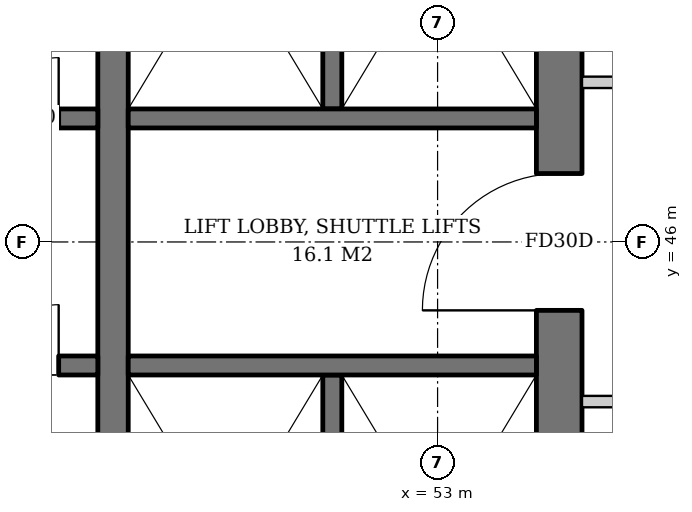
"""IFC4 building model, lengths in metres.
Left out: names, types, materials, properties, quantities, classifications, styles, units other than length and angle.
Written with IfcOpenShell. Run it as: python <this file> out.ifc"""

import sys

from ifc_helpers import new_model, si_unit, direction, frame, frame_2d, origin, place, context, subcontext, project, spatial, rectangle, extrude, element, fill, save


model = new_model("IFC4")
c1 = context("Model", 3, precision=1e-05, world=origin(), true_north=direction((0.0, 1.0)))
c2 = subcontext(c1, "Body", "Model", "MODEL_VIEW")
j1 = project(units=[si_unit("LENGTHUNIT", "METRE"), si_unit("PLANEANGLEUNIT", "RADIAN")], contexts=[c1])
p1 = place(None, origin())
s1 = spatial("IfcSite", under=j1, at=p1, CompositionType="ELEMENT")
p2 = place(p1, origin())
s2 = spatial("IfcBuilding", under=s1, at=p2, CompositionType="ELEMENT")
p3 = place(p2, frame((0.0, 0.0, 203.4)))
s3 = spatial("IfcBuildingStorey", under=s2, at=p3, CompositionType="ELEMENT", Elevation=203.4)
p4 = place(p3, frame((54.6, 36.7, 0.0), z_axis=(0.0, 0.0, 1.0), x_axis=(0.0, 1.0, 0.0)))
e1 = element("IfcWall", 1, at=p4, inside=s3, PredefinedType="SHEAR", context=c2, shape_type="SweptSolid", body=[
    extrude(rectangle(XDim=18.6, YDim=0.6, at=frame_2d((9.3, 0.0))), origin(), (0.0, 0.0, 1.0), 3.8),
])
p5 = place(p4, frame((8.4, 0.0, 0.0)))
e2 = element("IfcOpeningElement", 2, at=p5, cuts=e1, PredefinedType="OPENING", context=c2, shape_type="SweptSolid", body=[
    extrude(rectangle(XDim=1.8, YDim=2.4, at=frame_2d((0.9, 1.2))), frame((0.0, 0.31, 0.0), z_axis=(0.0, -1.0, 0.0), x_axis=(1.0, 0.0, 0.0)), (0.0, 0.0, 1.0), 0.62),
])
p6 = place(p3, frame((48.73, 40.0, 0.0), z_axis=(0.0, 0.0, 1.0), x_axis=(0.0, 1.0, 0.0)))
e3 = element("IfcWall", 3, at=p6, inside=s3, PredefinedType="SHEAR", context=c2, shape_type="SweptSolid", body=[
    extrude(rectangle(XDim=12.0, YDim=0.4, at=frame_2d((6.0, 0.0))), origin(), (0.0, 0.0, 1.0), 3.8),
])
p7 = place(p3, frame((35.7, 47.625, 0.0), z_axis=(0.0, 0.0, 1.0), x_axis=(1.0, 0.0, 0.0)))
e4 = element("IfcWall", 4, at=p7, inside=s3, PredefinedType="SHEAR", context=c2, shape_type="SweptSolid", body=[
    extrude(rectangle(XDim=12.83, YDim=0.25, at=frame_2d((6.415, 0.0))), origin(), (0.0, 0.0, 1.0), 3.8),
])
p8 = place(p7, frame((0.7, 0.0, 0.0)))
e5 = element("IfcOpeningElement", 5, at=p8, cuts=e4, PredefinedType="OPENING", context=c2, shape_type="SweptSolid", body=[
    extrude(rectangle(XDim=1.1, YDim=2.2, at=frame_2d((0.55, 1.1))), frame((0.0, 0.135, 0.0), z_axis=(0.0, -1.0, 0.0), x_axis=(1.0, 0.0, 0.0)), (0.0, 0.0, 1.0), 0.27),
])
p9 = place(p7, frame((3.45, 0.0, 0.0)))
e6 = element("IfcOpeningElement", 6, at=p9, cuts=e4, PredefinedType="OPENING", context=c2, shape_type="SweptSolid", body=[
    extrude(rectangle(XDim=1.1, YDim=2.2, at=frame_2d((0.55, 1.1))), frame((0.0, 0.135, 0.0), z_axis=(0.0, -1.0, 0.0), x_axis=(1.0, 0.0, 0.0)), (0.0, 0.0, 1.0), 0.27),
])
p10 = place(p7, frame((6.2, 0.0, 0.0)))
e7 = element("IfcOpeningElement", 7, at=p10, cuts=e4, PredefinedType="OPENING", context=c2, shape_type="SweptSolid", body=[
    extrude(rectangle(XDim=1.1, YDim=2.2, at=frame_2d((0.55, 1.1))), frame((0.0, 0.135, 0.0), z_axis=(0.0, -1.0, 0.0), x_axis=(1.0, 0.0, 0.0)), (0.0, 0.0, 1.0), 0.27),
])
p11 = place(p7, frame((9.0, 0.0, 0.0)))
e8 = element("IfcOpeningElement", 8, at=p11, cuts=e4, PredefinedType="OPENING", context=c2, shape_type="SweptSolid", body=[
    extrude(rectangle(XDim=1.0, YDim=2.1, at=frame_2d((0.5, 1.05))), frame((0.0, 0.135, 0.0), z_axis=(0.0, -1.0, 0.0), x_axis=(1.0, 0.0, 0.0)), (0.0, 0.0, 1.0), 0.27),
])
p12 = place(p7, frame((11.515, 0.0, 0.0)))
e9 = element("IfcOpeningElement", 9, at=p12, cuts=e4, PredefinedType="OPENING", context=c2, shape_type="SweptSolid", body=[
    extrude(rectangle(XDim=0.8, YDim=2.0, at=frame_2d((0.4, 1.0))), frame((0.0, 0.135, 0.0), z_axis=(0.0, -1.0, 0.0), x_axis=(1.0, 0.0, 0.0)), (0.0, 0.0, 1.0), 0.27),
])
p13 = place(p3, frame((35.7, 44.375, 0.0), z_axis=(0.0, 0.0, 1.0), x_axis=(1.0, 0.0, 0.0)))
e10 = element("IfcWall", 10, at=p13, inside=s3, PredefinedType="SHEAR", context=c2, shape_type="SweptSolid", body=[
    extrude(rectangle(XDim=12.83, YDim=0.25, at=frame_2d((6.415, 0.0))), origin(), (0.0, 0.0, 1.0), 3.8),
])
p14 = place(p13, frame((0.7, 0.0, 0.0)))
e11 = element("IfcOpeningElement", 11, at=p14, cuts=e10, PredefinedType="OPENING", context=c2, shape_type="SweptSolid", body=[
    extrude(rectangle(XDim=1.1, YDim=2.2, at=frame_2d((0.55, 1.1))), frame((0.0, 0.135, 0.0), z_axis=(0.0, -1.0, 0.0), x_axis=(1.0, 0.0, 0.0)), (0.0, 0.0, 1.0), 0.27),
])
p15 = place(p13, frame((3.45, 0.0, 0.0)))
e12 = element("IfcOpeningElement", 12, at=p15, cuts=e10, PredefinedType="OPENING", context=c2, shape_type="SweptSolid", body=[
    extrude(rectangle(XDim=1.1, YDim=2.2, at=frame_2d((0.55, 1.1))), frame((0.0, 0.135, 0.0), z_axis=(0.0, -1.0, 0.0), x_axis=(1.0, 0.0, 0.0)), (0.0, 0.0, 1.0), 0.27),
])
p16 = place(p13, frame((6.2, 0.0, 0.0)))
e13 = element("IfcOpeningElement", 13, at=p16, cuts=e10, PredefinedType="OPENING", context=c2, shape_type="SweptSolid", body=[
    extrude(rectangle(XDim=1.1, YDim=2.2, at=frame_2d((0.55, 1.1))), frame((0.0, 0.135, 0.0), z_axis=(0.0, -1.0, 0.0), x_axis=(1.0, 0.0, 0.0)), (0.0, 0.0, 1.0), 0.27),
])
p17 = place(p13, frame((9.0, 0.0, 0.0)))
e14 = element("IfcOpeningElement", 14, at=p17, cuts=e10, PredefinedType="OPENING", context=c2, shape_type="SweptSolid", body=[
    extrude(rectangle(XDim=1.0, YDim=2.1, at=frame_2d((0.5, 1.05))), frame((0.0, 0.135, 0.0), z_axis=(0.0, -1.0, 0.0), x_axis=(1.0, 0.0, 0.0)), (0.0, 0.0, 1.0), 0.27),
])
p18 = place(p13, frame((11.515, 0.0, 0.0)))
e15 = element("IfcOpeningElement", 15, at=p18, cuts=e10, PredefinedType="OPENING", context=c2, shape_type="SweptSolid", body=[
    extrude(rectangle(XDim=0.8, YDim=2.0, at=frame_2d((0.4, 1.0))), frame((0.0, 0.135, 0.0), z_axis=(0.0, -1.0, 0.0), x_axis=(1.0, 0.0, 0.0)), (0.0, 0.0, 1.0), 0.27),
])
p19 = place(p3, frame((51.615, 47.75, 0.0), z_axis=(0.0, 0.0, 1.0), x_axis=(0.0, 1.0, 0.0)))
e16 = element("IfcWall", 16, at=p19, inside=s3, PredefinedType="SHEAR", context=c2, shape_type="SweptSolid", body=[
    extrude(rectangle(XDim=4.25, YDim=0.25, at=frame_2d((2.125, 0.0))), origin(), (0.0, 0.0, 1.0), 3.8),
])
p20 = place(p3, frame((48.93, 47.625, 0.0), z_axis=(0.0, 0.0, 1.0), x_axis=(1.0, 0.0, 0.0)))
e17 = element("IfcWall", 17, at=p20, inside=s3, PredefinedType="SHEAR", context=c2, shape_type="SweptSolid", body=[
    extrude(rectangle(XDim=5.37, YDim=0.25, at=frame_2d((2.685, 0.0))), origin(), (0.0, 0.0, 1.0), 3.8),
])
p21 = place(p3, frame((51.615, 44.25, 0.0), z_axis=(0.0, 0.0, 1.0), x_axis=(0.0, -1.0, 0.0)))
e18 = element("IfcWall", 18, at=p21, inside=s3, PredefinedType="SHEAR", context=c2, shape_type="SweptSolid", body=[
    extrude(rectangle(XDim=4.25, YDim=0.25, at=frame_2d((2.125, 0.0))), origin(), (0.0, 0.0, 1.0), 3.8),
])
p22 = place(p3, frame((48.93, 44.375, 0.0), z_axis=(0.0, 0.0, 1.0), x_axis=(1.0, 0.0, 0.0)))
e19 = element("IfcWall", 19, at=p22, inside=s3, PredefinedType="SHEAR", context=c2, shape_type="SweptSolid", body=[
    extrude(rectangle(XDim=5.37, YDim=0.25, at=frame_2d((2.685, 0.0))), origin(), (0.0, 0.0, 1.0), 3.8),
])
p23 = place(p3, frame((54.9, 43.9, 0.0), z_axis=(0.0, 0.0, 1.0), x_axis=(1.0, 0.0, 0.0)))
e20 = element("IfcWall", 20, at=p23, inside=s3, PredefinedType="PARTITIONING", context=c2, shape_type="SweptSolid", body=[
    extrude(rectangle(XDim=2.925, YDim=0.15, at=frame_2d((1.462, 0.0))), origin(), (0.0, 0.0, 1.0), 3.62),
])
p24 = place(p3, frame((54.9, 48.1, 0.0), z_axis=(0.0, 0.0, 1.0), x_axis=(1.0, 0.0, 0.0)))
e21 = element("IfcWall", 21, at=p24, inside=s3, PredefinedType="PARTITIONING", context=c2, shape_type="SweptSolid", body=[
    extrude(rectangle(XDim=2.925, YDim=0.15, at=frame_2d((1.462, 0.0))), origin(), (0.0, 0.0, 1.0), 2.867),
])
p25 = place(p12, origin())
e22 = element("IfcDoor", 22, at=p25, inside=s3, OperationType="SINGLE_SWING_RIGHT", PredefinedType="DOOR", context=c2, shape_type="SweptSolid", body=[
    extrude(rectangle(XDim=0.8, YDim=2.0, at=frame_2d((0.4, 1.0))), frame((0.0, 0.025, 0.0), z_axis=(0.0, -1.0, 0.0), x_axis=(1.0, 0.0, 0.0)), (0.0, 0.0, 1.0), 0.05),
])
fill(e9, e22)
p26 = place(p18, origin())
e23 = element("IfcDoor", 23, at=p26, inside=s3, OperationType="SINGLE_SWING_RIGHT", PredefinedType="DOOR", context=c2, shape_type="SweptSolid", body=[
    extrude(rectangle(XDim=0.8, YDim=2.0, at=frame_2d((0.4, 1.0))), frame((0.0, 0.025, 0.0), z_axis=(0.0, -1.0, 0.0), x_axis=(1.0, 0.0, 0.0)), (0.0, 0.0, 1.0), 0.05),
])
fill(e15, e23)
p27 = place(p5, origin())
e24 = element("IfcDoor", 24, at=p27, inside=s3, OperationType="DOUBLE_DOOR_SINGLE_SWING", PredefinedType="DOOR", context=c2, shape_type="SweptSolid", body=[
    extrude(rectangle(XDim=1.8, YDim=2.4, at=frame_2d((0.9, 1.2))), frame((0.0, 0.025, 0.0), z_axis=(0.0, -1.0, 0.0), x_axis=(1.0, 0.0, 0.0)), (0.0, 0.0, 1.0), 0.05),
])
fill(e2, e24)
save(model, sys.argv[1])
